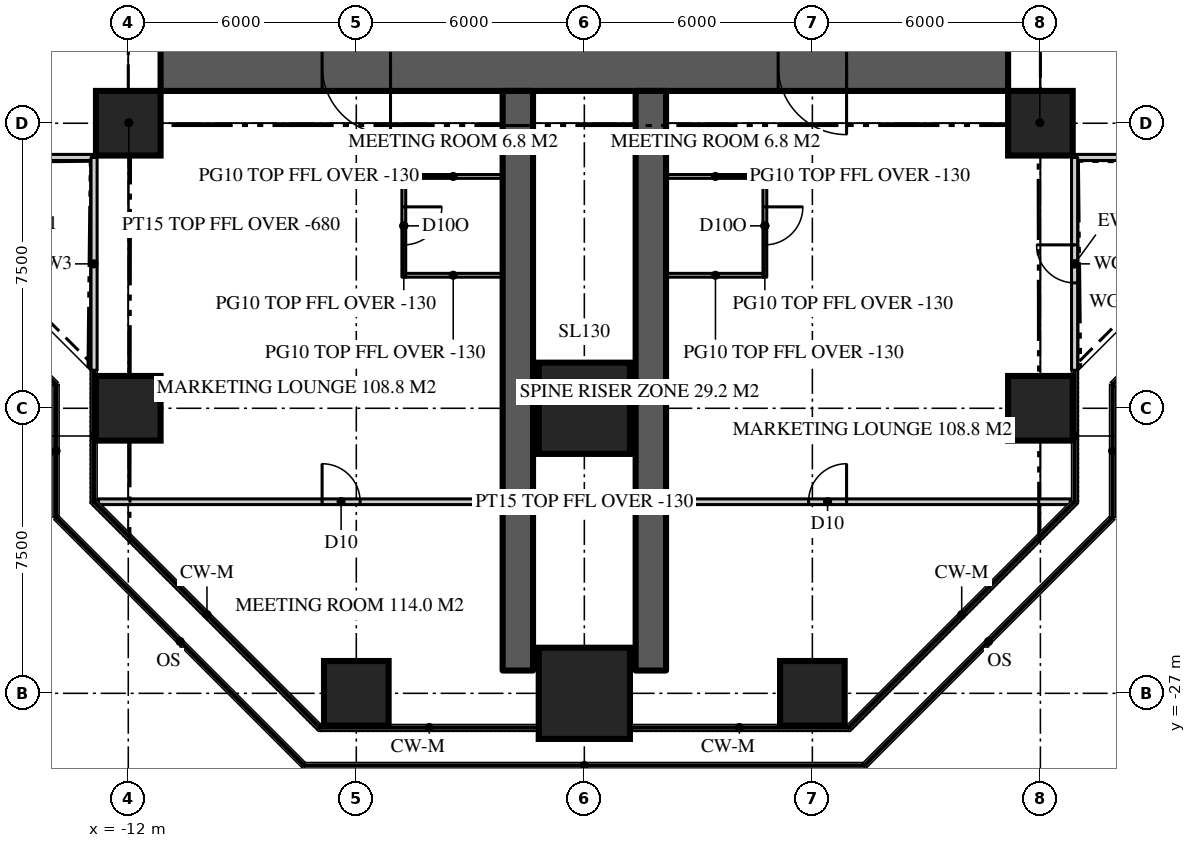
"""IFC4 building model, lengths in metres.
Left out: names, types, materials, properties, quantities, classifications, styles, units other than length and angle.
Written with IfcOpenShell. Run it as: python <this file> out.ifc"""

import sys

from ifc_helpers import new_model, si_unit, direction, frame, frame_2d, origin, origin_2d, place, context, subcontext, project, spatial, rectangle, extrude, element, fill, save


model = new_model("IFC4")
c1 = context("Model", 3, precision=1e-05, world=origin(), true_north=direction((0.0, 1.0)))
c2 = subcontext(c1, "Body", "Model", "MODEL_VIEW")
j1 = project(units=[si_unit("LENGTHUNIT", "METRE"), si_unit("PLANEANGLEUNIT", "RADIAN")], contexts=[c1])
p1 = place(None, origin())
s1 = spatial("IfcSite", under=j1, at=p1, CompositionType="ELEMENT")
p2 = place(p1, origin())
s2 = spatial("IfcBuilding", under=s1, at=p2, CompositionType="ELEMENT")
p3 = place(p2, frame((0.0, 0.0, 186.6)))
s3 = spatial("IfcBuildingStorey", under=s2, at=p3, CompositionType="ELEMENT", Elevation=186.6)
p4 = place(p3, frame((11.15, -10.5, 0.0), z_axis=(0.0, 0.0, 1.0), x_axis=(-1.0, 0.0, 0.0)))
e1 = element("IfcWall", 1, at=p4, inside=s3, PredefinedType="SHEAR", context=c2, shape_type="SweptSolid", body=[
    extrude(rectangle(XDim=22.3, YDim=1.3, at=frame_2d((11.15, 0.0))), origin(), (0.0, 0.0, 1.0), 3.9),
])
p5 = place(p4, frame((16.25, 0.0, 0.0)))
e2 = element("IfcOpeningElement", 2, at=p5, cuts=e1, PredefinedType="OPENING", context=c2, shape_type="SweptSolid", body=[
    extrude(rectangle(XDim=1.8, YDim=2.2, at=frame_2d((0.9, 1.1))), frame((0.0, 0.66, 0.0), z_axis=(0.0, -1.0, 0.0), x_axis=(1.0, 0.0, 0.0)), (0.0, 0.0, 1.0), 1.32),
])
p6 = place(p4, frame((4.25, 0.0, 0.0)))
e3 = element("IfcOpeningElement", 3, at=p6, cuts=e1, PredefinedType="OPENING", context=c2, shape_type="SweptSolid", body=[
    extrude(rectangle(XDim=1.8, YDim=2.2, at=frame_2d((0.9, 1.1))), frame((0.0, 0.66, 0.0), z_axis=(0.0, -1.0, 0.0), x_axis=(1.0, 0.0, 0.0)), (0.0, 0.0, 1.0), 1.32),
])
for number, where, z_axis, x_axis in (
    (4, (-1.75, -11.15, 0.0), (0.0, 0.0, 1.0), (0.0, -1.0, 0.0)),
    (5, (1.75, -11.15, 0.0), (0.0, 0.0, 1.0), (0.0, -1.0, 0.0)),
):
    element("IfcWall", number, at=place(p3, frame(where, z_axis=z_axis, x_axis=x_axis)), inside=s3, PredefinedType="SHEAR", context=c2, shape_type="SweptSolid", body=[
        extrude(rectangle(XDim=15.25, YDim=0.8, at=frame_2d((7.625, 0.0))), origin(), (0.0, 0.0, 1.0), 3.9),
    ])
p7 = place(p3, frame((-6.0, -27.0, 0.0), z_axis=(0.0, 0.0, 1.0), x_axis=(1.0, 0.0, 0.0)))
e6 = element("IfcColumn", 6, at=p7, inside=s3, PredefinedType="COLUMN", context=c2, shape_type="SweptSolid", body=[
    extrude(rectangle(XDim=1.7, YDim=1.7, at=origin_2d()), origin(), (0.0, 0.0, 1.0), 3.9),
])
p8 = place(p3, frame((0.0, -27.0, 0.0), z_axis=(0.0, 0.0, 1.0), x_axis=(1.0, 0.0, 0.0)))
e7 = element("IfcColumn", 7, at=p8, inside=s3, PredefinedType="COLUMN", context=c2, shape_type="SweptSolid", body=[
    extrude(rectangle(XDim=2.4, YDim=2.4, at=origin_2d()), origin(), (0.0, 0.0, 1.0), 3.9),
])
for number, where, z_axis, x_axis in (
    (8, (6.0, -27.0, 0.0), (0.0, 0.0, 1.0), (1.0, 0.0, 0.0)),
    (9, (-12.0, -19.5, 0.0), (0.0, 0.0, 1.0), (1.0, 0.0, 0.0)),
):
    element("IfcColumn", number, at=place(p3, frame(where, z_axis=z_axis, x_axis=x_axis)), inside=s3, PredefinedType="COLUMN", context=c2, shape_type="SweptSolid", body=[
        extrude(rectangle(XDim=1.7, YDim=1.7, at=origin_2d()), origin(), (0.0, 0.0, 1.0), 3.9),
    ])
p9 = place(p3, frame((0.0, -19.5, 0.0), z_axis=(0.0, 0.0, 1.0), x_axis=(1.0, 0.0, 0.0)))
e10 = element("IfcColumn", 10, at=p9, inside=s3, PredefinedType="COLUMN", context=c2, shape_type="SweptSolid", body=[
    extrude(rectangle(XDim=2.4, YDim=2.4, at=origin_2d()), origin(), (0.0, 0.0, 1.0), 3.9),
])
for number, where, z_axis, x_axis in (
    (11, (12.0, -19.5, 0.0), (0.0, 0.0, 1.0), (1.0, 0.0, 0.0)),
    (12, (-12.0, -12.0, 0.0), (0.0, 0.0, 1.0), (1.0, 0.0, 0.0)),
    (13, (12.0, -12.0, 0.0), (0.0, 0.0, 1.0), (1.0, 0.0, 0.0)),
):
    element("IfcColumn", number, at=place(p3, frame(where, z_axis=z_axis, x_axis=x_axis)), inside=s3, PredefinedType="COLUMN", context=c2, shape_type="SweptSolid", body=[
        extrude(rectangle(XDim=1.7, YDim=1.7, at=origin_2d()), origin(), (0.0, 0.0, 1.0), 3.9),
    ])
p10 = place(p3, frame((12.9, -12.9, 0.0), z_axis=(0.0, 0.0, 1.0), x_axis=(1.0, 0.0, 0.0)))
e14 = element("IfcWall", 14, at=p10, inside=s3, PredefinedType="SOLIDWALL", context=c2, shape_type="SweptSolid", body=[
    extrude(rectangle(XDim=5.6, YDim=0.16, at=frame_2d((2.8, 0.0))), origin(), (0.0, 0.0, 1.0), 3.77),
])
p11 = place(p3, frame((-18.5, -12.9, 0.0), z_axis=(0.0, 0.0, 1.0), x_axis=(1.0, 0.0, 0.0)))
e15 = element("IfcWall", 15, at=p11, inside=s3, PredefinedType="SOLIDWALL", context=c2, shape_type="SweptSolid", body=[
    extrude(rectangle(XDim=5.6, YDim=0.16, at=frame_2d((2.8, 0.0))), origin(), (0.0, 0.0, 1.0), 3.77),
])
p12 = place(p11, frame((2.3, 0.0, 0.0)))
e16 = element("IfcOpeningElement", 16, at=p12, cuts=e15, PredefinedType="OPENING", context=c2, shape_type="SweptSolid", body=[
    extrude(rectangle(XDim=1.0, YDim=2.2, at=frame_2d((0.5, 1.1))), frame((0.0, 0.09, 0.0), z_axis=(0.0, -1.0, 0.0), x_axis=(1.0, 0.0, 0.0)), (0.0, 0.0, 1.0), 0.18),
])
p13 = place(p3, frame((-12.9, -12.9, 0.0), z_axis=(0.0, 0.0, 1.0), x_axis=(0.0, -1.0, 0.0)))
e17 = element("IfcWall", 17, at=p13, inside=s3, PredefinedType="SOLIDWALL", context=c2, shape_type="SweptSolid", body=[
    extrude(rectangle(XDim=5.6, YDim=0.16, at=frame_2d((2.8, 0.0))), origin(), (0.0, 0.0, 1.0), 3.77),
])
p14 = place(p3, frame((12.9, -18.5, 0.0), z_axis=(0.0, 0.0, 1.0), x_axis=(0.0, 1.0, 0.0)))
e18 = element("IfcWall", 18, at=p14, inside=s3, PredefinedType="SOLIDWALL", context=c2, shape_type="SweptSolid", body=[
    extrude(rectangle(XDim=5.6, YDim=0.16, at=frame_2d((2.8, 0.0))), origin(), (0.0, 0.0, 1.0), 3.77),
])
p15 = place(p14, frame((2.3, 0.0, 0.0)))
e19 = element("IfcOpeningElement", 19, at=p15, cuts=e18, PredefinedType="OPENING", context=c2, shape_type="SweptSolid", body=[
    extrude(rectangle(XDim=1.0, YDim=2.2, at=frame_2d((0.5, 1.1))), frame((0.0, 0.09, 0.0), z_axis=(0.0, -1.0, 0.0), x_axis=(1.0, 0.0, 0.0)), (0.0, 0.0, 1.0), 0.18),
])
p16 = place(p3, frame((-12.786, -21.959, 0.0), z_axis=(0.0, 0.0, 1.0), x_axis=(1.0, 0.0, 0.0)))
e20 = element("IfcWall", 20, at=p16, inside=s3, PredefinedType="PARTITIONING", context=c2, shape_type="SweptSolid", body=[
    extrude(rectangle(XDim=25.573, YDim=0.15, at=frame_2d((12.786, 0.0))), origin(), (0.0, 0.0, 1.0), 3.77),
])
p17 = place(p16, frame((18.687, 0.0, 0.0)))
e21 = element("IfcOpeningElement", 21, at=p17, cuts=e20, PredefinedType="OPENING", context=c2, shape_type="SweptSolid", body=[
    extrude(rectangle(XDim=1.0, YDim=2.2, at=frame_2d((0.5, 1.1))), frame((0.0, 0.085, 0.0), z_axis=(0.0, -1.0, 0.0), x_axis=(1.0, 0.0, 0.0)), (0.0, 0.0, 1.0), 0.17),
])
p18 = place(p16, frame((5.886, 0.0, 0.0)))
e22 = element("IfcOpeningElement", 22, at=p18, cuts=e20, PredefinedType="OPENING", context=c2, shape_type="SweptSolid", body=[
    extrude(rectangle(XDim=1.0, YDim=2.2, at=frame_2d((0.5, 1.1))), frame((0.0, 0.085, 0.0), z_axis=(0.0, -1.0, 0.0), x_axis=(1.0, 0.0, 0.0)), (0.0, 0.0, 1.0), 0.17),
])
for number, where, z_axis, x_axis in (
    (23, (2.15, -13.4, 0.0), (0.0, 0.0, 1.0), (1.0, 0.0, 0.0)),
    (24, (2.15, -16.0, 0.0), (0.0, 0.0, 1.0), (1.0, 0.0, 0.0)),
):
    element("IfcWall", number, at=place(p3, frame(where, z_axis=z_axis, x_axis=x_axis)), inside=s3, PredefinedType="PARTITIONING", context=c2, shape_type="SweptSolid", body=[
        extrude(rectangle(XDim=2.6, YDim=0.1, at=frame_2d((1.3, 0.0))), origin(), (0.0, 0.0, 1.0), 3.77),
    ])
p19 = place(p3, frame((4.75, -13.35, 0.0), z_axis=(0.0, 0.0, 1.0), x_axis=(0.0, -1.0, 0.0)))
e25 = element("IfcWall", 25, at=p19, inside=s3, PredefinedType="PARTITIONING", context=c2, shape_type="SweptSolid", body=[
    extrude(rectangle(XDim=2.7, YDim=0.1, at=frame_2d((1.35, 0.0))), origin(), (0.0, 0.0, 1.0), 3.77),
])
p20 = place(p19, frame((0.85, 0.0, 0.0)))
e26 = element("IfcOpeningElement", 26, at=p20, cuts=e25, PredefinedType="OPENING", context=c2, shape_type="SweptSolid", body=[
    extrude(rectangle(XDim=1.0, YDim=2.2, at=frame_2d((0.5, 1.1))), frame((0.0, 0.06, 0.0), z_axis=(0.0, -1.0, 0.0), x_axis=(1.0, 0.0, 0.0)), (0.0, 0.0, 1.0), 0.12),
])
for number, where, z_axis, x_axis in (
    (27, (-2.15, -13.4, 0.0), (0.0, 0.0, 1.0), (-1.0, 0.0, 0.0)),
    (28, (-2.15, -16.0, 0.0), (0.0, 0.0, 1.0), (-1.0, 0.0, 0.0)),
):
    element("IfcWall", number, at=place(p3, frame(where, z_axis=z_axis, x_axis=x_axis)), inside=s3, PredefinedType="PARTITIONING", context=c2, shape_type="SweptSolid", body=[
        extrude(rectangle(XDim=2.6, YDim=0.1, at=frame_2d((1.3, 0.0))), origin(), (0.0, 0.0, 1.0), 3.77),
    ])
p21 = place(p3, frame((-4.75, -13.35, 0.0), z_axis=(0.0, 0.0, 1.0), x_axis=(0.0, -1.0, 0.0)))
e29 = element("IfcWall", 29, at=p21, inside=s3, PredefinedType="PARTITIONING", context=c2, shape_type="SweptSolid", body=[
    extrude(rectangle(XDim=2.7, YDim=0.1, at=frame_2d((1.35, 0.0))), origin(), (0.0, 0.0, 1.0), 3.77),
])
p22 = place(p21, frame((0.85, 0.0, 0.0)))
e30 = element("IfcOpeningElement", 30, at=p22, cuts=e29, PredefinedType="OPENING", context=c2, shape_type="SweptSolid", body=[
    extrude(rectangle(XDim=1.0, YDim=2.2, at=frame_2d((0.5, 1.1))), frame((0.0, 0.06, 0.0), z_axis=(0.0, -1.0, 0.0), x_axis=(1.0, 0.0, 0.0)), (0.0, 0.0, 1.0), 0.12),
])
for number, where, z_axis, x_axis in (
    (31, (-11.15, -11.15, 0.0), (0.0, 0.0, 1.0), (-0.707, -0.707, 0.0)),
    (32, (11.15, -11.15, 0.0), (0.0, 0.0, 1.0), (0.707, -0.707, 0.0)),
):
    element("IfcWall", number, at=place(p3, frame(where, z_axis=z_axis, x_axis=x_axis)), inside=s3, PredefinedType="PARTITIONING", context=c2, shape_type="SweptSolid", body=[
        extrude(rectangle(XDim=2.362, YDim=0.15, at=frame_2d((1.181, 0.0))), origin(), (0.0, 0.0, 1.0), 3.22),
    ])
p23 = place(p15, origin())
e33 = element("IfcDoor", 33, at=p23, inside=s3, OperationType="SINGLE_SWING_RIGHT", PredefinedType="DOOR", context=c2, shape_type="SweptSolid", body=[
    extrude(rectangle(XDim=1.0, YDim=2.2, at=frame_2d((0.5, 1.1))), frame((0.0, 0.025, 0.0), z_axis=(0.0, -1.0, 0.0), x_axis=(1.0, 0.0, 0.0)), (0.0, 0.0, 1.0), 0.05),
])
fill(e19, e33)
p24 = place(p5, origin())
e34 = element("IfcDoor", 34, at=p24, inside=s3, OperationType="DOUBLE_DOOR_DOUBLE_SWING", PredefinedType="DOOR", context=c2, shape_type="SweptSolid", body=[
    extrude(rectangle(XDim=1.8, YDim=2.2, at=frame_2d((0.9, 1.1))), frame((0.0, 0.025, 0.0), z_axis=(0.0, -1.0, 0.0), x_axis=(1.0, 0.0, 0.0)), (0.0, 0.0, 1.0), 0.05),
])
fill(e2, e34)
p25 = place(p6, origin())
e35 = element("IfcDoor", 35, at=p25, inside=s3, OperationType="DOUBLE_DOOR_DOUBLE_SWING", PredefinedType="DOOR", context=c2, shape_type="SweptSolid", body=[
    extrude(rectangle(XDim=1.8, YDim=2.2, at=frame_2d((0.9, 1.1))), frame((0.0, 0.025, 0.0), z_axis=(0.0, -1.0, 0.0), x_axis=(1.0, 0.0, 0.0)), (0.0, 0.0, 1.0), 0.05),
])
fill(e3, e35)
p26 = place(p17, origin())
e36 = element("IfcDoor", 36, at=p26, inside=s3, OperationType="SINGLE_SWING_RIGHT", PredefinedType="DOOR", context=c2, shape_type="SweptSolid", body=[
    extrude(rectangle(XDim=1.0, YDim=2.2, at=frame_2d((0.5, 1.1))), frame((0.0, 0.025, 0.0), z_axis=(0.0, -1.0, 0.0), x_axis=(1.0, 0.0, 0.0)), (0.0, 0.0, 1.0), 0.05),
])
fill(e21, e36)
p27 = place(p18, origin())
e37 = element("IfcDoor", 37, at=p27, inside=s3, OperationType="SINGLE_SWING_LEFT", PredefinedType="DOOR", context=c2, shape_type="SweptSolid", body=[
    extrude(rectangle(XDim=1.0, YDim=2.2, at=frame_2d((0.5, 1.1))), frame((0.0, 0.025, 0.0), z_axis=(0.0, -1.0, 0.0), x_axis=(1.0, 0.0, 0.0)), (0.0, 0.0, 1.0), 0.05),
])
fill(e22, e37)
p28 = place(p20, origin())
e38 = element("IfcDoor", 38, at=p28, inside=s3, OperationType="SINGLE_SWING_LEFT", PredefinedType="DOOR", context=c2, shape_type="SweptSolid", body=[
    extrude(rectangle(XDim=1.0, YDim=2.2, at=frame_2d((0.5, 1.1))), frame((0.0, 0.025, 0.0), z_axis=(0.0, -1.0, 0.0), x_axis=(1.0, 0.0, 0.0)), (0.0, 0.0, 1.0), 0.05),
])
fill(e26, e38)
p29 = place(p22, origin())
e39 = element("IfcDoor", 39, at=p29, inside=s3, OperationType="SINGLE_SWING_LEFT", PredefinedType="DOOR", context=c2, shape_type="SweptSolid", body=[
    extrude(rectangle(XDim=1.0, YDim=2.2, at=frame_2d((0.5, 1.1))), frame((0.0, 0.025, 0.0), z_axis=(0.0, -1.0, 0.0), x_axis=(1.0, 0.0, 0.0)), (0.0, 0.0, 1.0), 0.05),
])
fill(e30, e39)
save(model, sys.argv[1])
